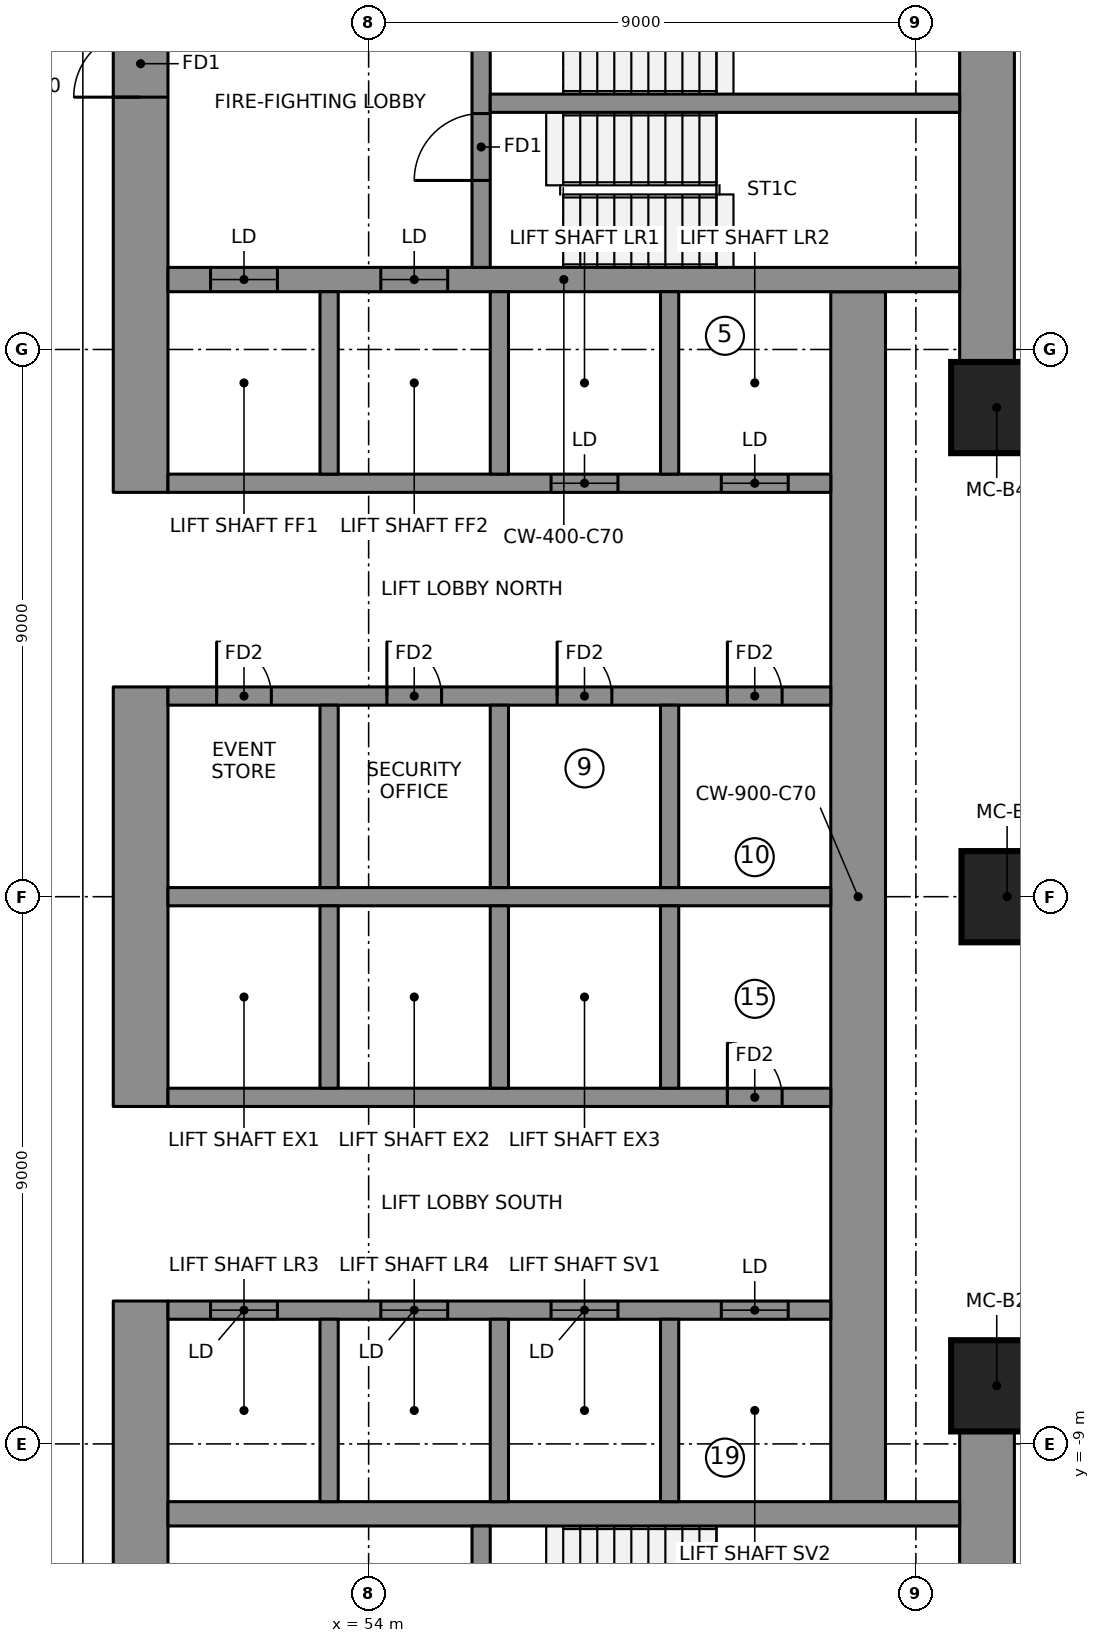
"""IFC4 building model, lengths in metres.
Left out: names, types, materials, properties, quantities, classifications, styles, units other than length and angle.
Written with IfcOpenShell. Run it as: python <this file> out.ifc"""

import sys

from ifc_helpers import new_model, si_unit, direction, frame, frame_2d, origin, origin_2d, place, context, subcontext, project, spatial, rectangle, extrude, element, fill, save


model = new_model("IFC4")
c1 = context("Model", 3, precision=1e-05, world=origin(), true_north=direction((0.0, 1.0)))
c2 = subcontext(c1, "Body", "Model", "MODEL_VIEW")
j1 = project(units=[si_unit("LENGTHUNIT", "METRE"), si_unit("PLANEANGLEUNIT", "RADIAN")], contexts=[c1])
p1 = place(None, origin())
s1 = spatial("IfcSite", under=j1, at=p1, CompositionType="ELEMENT")
p2 = place(p1, origin())
s2 = spatial("IfcBuilding", under=s1, at=p2, CompositionType="ELEMENT")
p3 = place(p2, frame((0.0, 0.0, 133.75)))
s3 = spatial("IfcBuildingStorey", under=s2, at=p3, CompositionType="ELEMENT", Elevation=133.75)
p4 = place(p3, frame((50.25, 6.65, 0.0), z_axis=(0.0, 0.0, 1.0), x_axis=(0.0, 1.0, 0.0)))
e1 = element("IfcWall", 1, at=p4, inside=s3, PredefinedType="SHEAR", context=c2, shape_type="SweptSolid", body=[
    extrude(rectangle(XDim=10.0, YDim=0.9, at=frame_2d((5.0, 0.0))), origin(), (0.0, 0.0, 1.0), 3.55),
])
p5 = place(p4, frame((6.5, 0.0, 0.0)))
e2 = element("IfcOpeningElement", 2, at=p5, cuts=e1, PredefinedType="OPENING", context=c2, shape_type="SweptSolid", body=[
    extrude(rectangle(XDim=1.1, YDim=2.1, at=frame_2d((0.55, 1.05))), frame((0.0, 0.46, 0.0), z_axis=(0.0, -1.0, 0.0), x_axis=(1.0, 0.0, 0.0)), (0.0, 0.0, 1.0), 0.92),
])
p6 = place(p3, frame((50.25, -3.45, 0.0), z_axis=(0.0, 0.0, 1.0), x_axis=(0.0, 1.0, 0.0)))
e3 = element("IfcWall", 3, at=p6, inside=s3, PredefinedType="SHEAR", context=c2, shape_type="SweptSolid", body=[
    extrude(rectangle(XDim=6.9, YDim=0.9, at=frame_2d((3.45, 0.0))), origin(), (0.0, 0.0, 1.0), 3.55),
])
p7 = place(p3, frame((50.25, -16.65, 0.0), z_axis=(0.0, 0.0, 1.0), x_axis=(0.0, 1.0, 0.0)))
e4 = element("IfcWall", 4, at=p7, inside=s3, PredefinedType="SHEAR", context=c2, shape_type="SweptSolid", body=[
    extrude(rectangle(XDim=10.0, YDim=0.9, at=frame_2d((5.0, 0.0))), origin(), (0.0, 0.0, 1.0), 3.55),
])
p8 = place(p7, frame((2.4, 0.0, 0.0)))
e5 = element("IfcOpeningElement", 5, at=p8, cuts=e4, PredefinedType="OPENING", context=c2, shape_type="SweptSolid", body=[
    extrude(rectangle(XDim=1.1, YDim=2.1, at=frame_2d((0.55, 1.05))), frame((0.0, 0.46, 0.0), z_axis=(0.0, -1.0, 0.0), x_axis=(1.0, 0.0, 0.0)), (0.0, 0.0, 1.0), 0.92),
])
for number, where, z_axis, x_axis in (
    (6, (64.17, 8.745, 0.0), (0.0, 0.0, 1.0), (0.0, 1.0, 0.0)),
    (7, (64.17, -15.75, 0.0), (0.0, 0.0, 1.0), (0.0, 1.0, 0.0)),
):
    element("IfcWall", number, at=place(p3, frame(where, z_axis=z_axis, x_axis=x_axis)), inside=s3, PredefinedType="SHEAR", context=c2, shape_type="SweptSolid", body=[
        extrude(rectangle(XDim=7.005, YDim=0.9, at=frame_2d((3.503, 0.0))), origin(), (0.0, 0.0, 1.0), 3.55),
    ])
p9 = place(p3, frame((62.05, -9.95, 0.0), z_axis=(0.0, 0.0, 1.0), x_axis=(0.0, 1.0, 0.0)))
e8 = element("IfcWall", 8, at=p9, inside=s3, PredefinedType="SHEAR", context=c2, shape_type="SweptSolid", body=[
    extrude(rectangle(XDim=19.9, YDim=0.9, at=frame_2d((9.95, 0.0))), origin(), (0.0, 0.0, 1.0), 3.55),
])
p10 = place(p3, frame((50.7, 10.15, 0.0), z_axis=(0.0, 0.0, 1.0), x_axis=(1.0, 0.0, 0.0)))
e9 = element("IfcWall", 9, at=p10, inside=s3, PredefinedType="SHEAR", context=c2, shape_type="SweptSolid", body=[
    extrude(rectangle(XDim=13.02, YDim=0.4, at=frame_2d((6.51, 0.0))), origin(), (0.0, 0.0, 1.0), 3.55),
])
p11 = place(p10, frame((0.7, 0.0, 0.0)))
e10 = element("IfcOpeningElement", 10, at=p11, cuts=e9, PredefinedType="OPENING", context=c2, shape_type="SweptSolid", body=[
    extrude(rectangle(XDim=1.1, YDim=2.1, at=frame_2d((0.55, 1.05))), frame((0.0, 0.21, 0.0), z_axis=(0.0, -1.0, 0.0), x_axis=(1.0, 0.0, 0.0)), (0.0, 0.0, 1.0), 0.42),
])
p12 = place(p10, frame((3.5, 0.0, 0.0)))
e11 = element("IfcOpeningElement", 11, at=p12, cuts=e9, PredefinedType="OPENING", context=c2, shape_type="SweptSolid", body=[
    extrude(rectangle(XDim=1.1, YDim=2.1, at=frame_2d((0.55, 1.05))), frame((0.0, 0.21, 0.0), z_axis=(0.0, -1.0, 0.0), x_axis=(1.0, 0.0, 0.0)), (0.0, 0.0, 1.0), 0.42),
])
p13 = place(p3, frame((50.7, -10.15, 0.0), z_axis=(0.0, 0.0, 1.0), x_axis=(1.0, 0.0, 0.0)))
e12 = element("IfcWall", 12, at=p13, inside=s3, PredefinedType="SHEAR", context=c2, shape_type="SweptSolid", body=[
    extrude(rectangle(XDim=13.02, YDim=0.4, at=frame_2d((6.51, 0.0))), origin(), (0.0, 0.0, 1.0), 3.55),
])
p14 = place(p3, frame((50.7, 0.0, 0.0), z_axis=(0.0, 0.0, 1.0), x_axis=(1.0, 0.0, 0.0)))
e13 = element("IfcWall", 13, at=p14, inside=s3, PredefinedType="SHEAR", context=c2, shape_type="SweptSolid", body=[
    extrude(rectangle(XDim=10.9, YDim=0.3, at=frame_2d((5.45, 0.0))), origin(), (0.0, 0.0, 1.0), 3.55),
])
p15 = place(p3, frame((50.7, 3.3, 0.0), z_axis=(0.0, 0.0, 1.0), x_axis=(1.0, 0.0, 0.0)))
e14 = element("IfcWall", 14, at=p15, inside=s3, PredefinedType="SHEAR", context=c2, shape_type="SweptSolid", body=[
    extrude(rectangle(XDim=10.9, YDim=0.3, at=frame_2d((5.45, 0.0))), origin(), (0.0, 0.0, 1.0), 3.55),
])
p16 = place(p15, frame((0.8, 0.0, 0.0)))
e15 = element("IfcOpeningElement", 15, at=p16, cuts=e14, PredefinedType="OPENING", context=c2, shape_type="SweptSolid", body=[
    extrude(rectangle(XDim=0.9, YDim=2.1, at=frame_2d((0.45, 1.05))), frame((0.0, 0.16, 0.0), z_axis=(0.0, -1.0, 0.0), x_axis=(1.0, 0.0, 0.0)), (0.0, 0.0, 1.0), 0.32),
])
p17 = place(p15, frame((3.6, 0.0, 0.0)))
e16 = element("IfcOpeningElement", 16, at=p17, cuts=e14, PredefinedType="OPENING", context=c2, shape_type="SweptSolid", body=[
    extrude(rectangle(XDim=0.9, YDim=2.1, at=frame_2d((0.45, 1.05))), frame((0.0, 0.16, 0.0), z_axis=(0.0, -1.0, 0.0), x_axis=(1.0, 0.0, 0.0)), (0.0, 0.0, 1.0), 0.32),
])
p18 = place(p15, frame((6.4, 0.0, 0.0)))
e17 = element("IfcOpeningElement", 17, at=p18, cuts=e14, PredefinedType="OPENING", context=c2, shape_type="SweptSolid", body=[
    extrude(rectangle(XDim=0.9, YDim=2.1, at=frame_2d((0.45, 1.05))), frame((0.0, 0.16, 0.0), z_axis=(0.0, -1.0, 0.0), x_axis=(1.0, 0.0, 0.0)), (0.0, 0.0, 1.0), 0.32),
])
p19 = place(p15, frame((9.2, 0.0, 0.0)))
e18 = element("IfcOpeningElement", 18, at=p19, cuts=e14, PredefinedType="OPENING", context=c2, shape_type="SweptSolid", body=[
    extrude(rectangle(XDim=0.9, YDim=2.1, at=frame_2d((0.45, 1.05))), frame((0.0, 0.16, 0.0), z_axis=(0.0, -1.0, 0.0), x_axis=(1.0, 0.0, 0.0)), (0.0, 0.0, 1.0), 0.32),
])
p20 = place(p3, frame((50.7, 6.8, 0.0), z_axis=(0.0, 0.0, 1.0), x_axis=(1.0, 0.0, 0.0)))
e19 = element("IfcWall", 19, at=p20, inside=s3, PredefinedType="SHEAR", context=c2, shape_type="SweptSolid", body=[
    extrude(rectangle(XDim=10.9, YDim=0.3, at=frame_2d((5.45, 0.0))), origin(), (0.0, 0.0, 1.0), 3.55),
])
p21 = place(p20, frame((6.3, 0.0, 0.0)))
e20 = element("IfcOpeningElement", 20, at=p21, cuts=e19, PredefinedType="OPENING", context=c2, shape_type="SweptSolid", body=[
    extrude(rectangle(XDim=1.1, YDim=2.1, at=frame_2d((0.55, 1.05))), frame((0.0, 0.16, 0.0), z_axis=(0.0, -1.0, 0.0), x_axis=(1.0, 0.0, 0.0)), (0.0, 0.0, 1.0), 0.32),
])
p22 = place(p20, frame((9.1, 0.0, 0.0)))
e21 = element("IfcOpeningElement", 21, at=p22, cuts=e19, PredefinedType="OPENING", context=c2, shape_type="SweptSolid", body=[
    extrude(rectangle(XDim=1.1, YDim=2.1, at=frame_2d((0.55, 1.05))), frame((0.0, 0.16, 0.0), z_axis=(0.0, -1.0, 0.0), x_axis=(1.0, 0.0, 0.0)), (0.0, 0.0, 1.0), 0.32),
])
for number, where, z_axis, x_axis in (
    (22, (53.35, 0.15, 0.0), (0.0, 0.0, 1.0), (0.0, 1.0, 0.0)),
    (23, (53.35, 6.95, 0.0), (0.0, 0.0, 1.0), (0.0, 1.0, 0.0)),
    (24, (56.15, 0.15, 0.0), (0.0, 0.0, 1.0), (0.0, 1.0, 0.0)),
    (25, (56.15, 6.95, 0.0), (0.0, 0.0, 1.0), (0.0, 1.0, 0.0)),
    (26, (58.95, 0.15, 0.0), (0.0, 0.0, 1.0), (0.0, 1.0, 0.0)),
    (27, (58.95, 6.95, 0.0), (0.0, 0.0, 1.0), (0.0, 1.0, 0.0)),
):
    element("IfcWall", number, at=place(p3, frame(where, z_axis=z_axis, x_axis=x_axis)), inside=s3, PredefinedType="SHEAR", context=c2, shape_type="SweptSolid", body=[
        extrude(rectangle(XDim=3.0, YDim=0.3, at=frame_2d((1.5, 0.0))), origin(), (0.0, 0.0, 1.0), 3.55),
    ])
p23 = place(p3, frame((50.7, -3.3, 0.0), z_axis=(0.0, 0.0, 1.0), x_axis=(1.0, 0.0, 0.0)))
e28 = element("IfcWall", 28, at=p23, inside=s3, PredefinedType="SHEAR", context=c2, shape_type="SweptSolid", body=[
    extrude(rectangle(XDim=10.9, YDim=0.3, at=frame_2d((5.45, 0.0))), origin(), (0.0, 0.0, 1.0), 3.55),
])
p24 = place(p23, frame((9.2, 0.0, 0.0)))
e29 = element("IfcOpeningElement", 29, at=p24, cuts=e28, PredefinedType="OPENING", context=c2, shape_type="SweptSolid", body=[
    extrude(rectangle(XDim=0.9, YDim=2.1, at=frame_2d((0.45, 1.05))), frame((0.0, 0.16, 0.0), z_axis=(0.0, -1.0, 0.0), x_axis=(1.0, 0.0, 0.0)), (0.0, 0.0, 1.0), 0.32),
])
p25 = place(p3, frame((50.7, -6.8, 0.0), z_axis=(0.0, 0.0, 1.0), x_axis=(1.0, 0.0, 0.0)))
e30 = element("IfcWall", 30, at=p25, inside=s3, PredefinedType="SHEAR", context=c2, shape_type="SweptSolid", body=[
    extrude(rectangle(XDim=10.9, YDim=0.3, at=frame_2d((5.45, 0.0))), origin(), (0.0, 0.0, 1.0), 3.55),
])
p26 = place(p25, frame((0.7, 0.0, 0.0)))
e31 = element("IfcOpeningElement", 31, at=p26, cuts=e30, PredefinedType="OPENING", context=c2, shape_type="SweptSolid", body=[
    extrude(rectangle(XDim=1.1, YDim=2.1, at=frame_2d((0.55, 1.05))), frame((0.0, 0.16, 0.0), z_axis=(0.0, -1.0, 0.0), x_axis=(1.0, 0.0, 0.0)), (0.0, 0.0, 1.0), 0.32),
])
p27 = place(p25, frame((3.5, 0.0, 0.0)))
e32 = element("IfcOpeningElement", 32, at=p27, cuts=e30, PredefinedType="OPENING", context=c2, shape_type="SweptSolid", body=[
    extrude(rectangle(XDim=1.1, YDim=2.1, at=frame_2d((0.55, 1.05))), frame((0.0, 0.16, 0.0), z_axis=(0.0, -1.0, 0.0), x_axis=(1.0, 0.0, 0.0)), (0.0, 0.0, 1.0), 0.32),
])
p28 = place(p25, frame((6.3, 0.0, 0.0)))
e33 = element("IfcOpeningElement", 33, at=p28, cuts=e30, PredefinedType="OPENING", context=c2, shape_type="SweptSolid", body=[
    extrude(rectangle(XDim=1.1, YDim=2.1, at=frame_2d((0.55, 1.05))), frame((0.0, 0.16, 0.0), z_axis=(0.0, -1.0, 0.0), x_axis=(1.0, 0.0, 0.0)), (0.0, 0.0, 1.0), 0.32),
])
p29 = place(p25, frame((9.1, 0.0, 0.0)))
e34 = element("IfcOpeningElement", 34, at=p29, cuts=e30, PredefinedType="OPENING", context=c2, shape_type="SweptSolid", body=[
    extrude(rectangle(XDim=1.1, YDim=2.1, at=frame_2d((0.55, 1.05))), frame((0.0, 0.16, 0.0), z_axis=(0.0, -1.0, 0.0), x_axis=(1.0, 0.0, 0.0)), (0.0, 0.0, 1.0), 0.32),
])
for number, where, z_axis, x_axis in (
    (35, (53.35, -3.15, 0.0), (0.0, 0.0, 1.0), (0.0, 1.0, 0.0)),
    (36, (53.35, -9.95, 0.0), (0.0, 0.0, 1.0), (0.0, 1.0, 0.0)),
    (37, (56.15, -3.15, 0.0), (0.0, 0.0, 1.0), (0.0, 1.0, 0.0)),
    (38, (56.15, -9.95, 0.0), (0.0, 0.0, 1.0), (0.0, 1.0, 0.0)),
    (39, (58.95, -3.15, 0.0), (0.0, 0.0, 1.0), (0.0, 1.0, 0.0)),
    (40, (58.95, -9.95, 0.0), (0.0, 0.0, 1.0), (0.0, 1.0, 0.0)),
):
    element("IfcWall", number, at=place(p3, frame(where, z_axis=z_axis, x_axis=x_axis)), inside=s3, PredefinedType="SHEAR", context=c2, shape_type="SweptSolid", body=[
        extrude(rectangle(XDim=3.0, YDim=0.3, at=frame_2d((1.5, 0.0))), origin(), (0.0, 0.0, 1.0), 3.55),
    ])
p30 = place(p3, frame((55.85, 10.35, 0.0), z_axis=(0.0, 0.0, 1.0), x_axis=(0.0, 1.0, 0.0)))
e41 = element("IfcWall", 41, at=p30, inside=s3, PredefinedType="SHEAR", context=c2, shape_type="SweptSolid", body=[
    extrude(rectangle(XDim=5.4, YDim=0.3, at=frame_2d((2.7, 0.0))), origin(), (0.0, 0.0, 1.0), 3.55),
])
p31 = place(p30, frame((1.43, 0.0, 0.0)))
e42 = element("IfcOpeningElement", 42, at=p31, cuts=e41, PredefinedType="OPENING", context=c2, shape_type="SweptSolid", body=[
    extrude(rectangle(XDim=1.1, YDim=2.1, at=frame_2d((0.55, 1.05))), frame((0.0, 0.16, 0.0), z_axis=(0.0, -1.0, 0.0), x_axis=(1.0, 0.0, 0.0)), (0.0, 0.0, 1.0), 0.32),
])
p32 = place(p30, frame((3.6, 0.0, 0.0)))
e43 = element("IfcOpeningElement", 43, at=p32, cuts=e41, PredefinedType="OPENING", context=c2, shape_type="SweptSolid", body=[
    extrude(rectangle(XDim=1.1, YDim=2.1, at=frame_2d((0.55, 1.05))), frame((0.0, 0.16, 0.0), z_axis=(0.0, -1.0, 0.0), x_axis=(1.0, 0.0, 0.0)), (0.0, 0.0, 1.0), 0.32),
])
p33 = place(p3, frame((55.85, -15.75, 0.0), z_axis=(0.0, 0.0, 1.0), x_axis=(0.0, 1.0, 0.0)))
e44 = element("IfcWall", 44, at=p33, inside=s3, PredefinedType="SHEAR", context=c2, shape_type="SweptSolid", body=[
    extrude(rectangle(XDim=5.4, YDim=0.3, at=frame_2d((2.7, 0.0))), origin(), (0.0, 0.0, 1.0), 3.55),
])
p34 = place(p33, frame((3.6, 0.0, 0.0)))
e45 = element("IfcOpeningElement", 45, at=p34, cuts=e44, PredefinedType="OPENING", context=c2, shape_type="SweptSolid", body=[
    extrude(rectangle(XDim=1.1, YDim=2.1, at=frame_2d((0.55, 1.05))), frame((0.0, 0.16, 0.0), z_axis=(0.0, -1.0, 0.0), x_axis=(1.0, 0.0, 0.0)), (0.0, 0.0, 1.0), 0.32),
])
p35 = place(p33, frame((0.8, 0.0, 0.0)))
e46 = element("IfcOpeningElement", 46, at=p35, cuts=e44, PredefinedType="OPENING", context=c2, shape_type="SweptSolid", body=[
    extrude(rectangle(XDim=0.9, YDim=2.1, at=frame_2d((0.45, 1.05))), frame((0.0, 0.16, 0.0), z_axis=(0.0, -1.0, 0.0), x_axis=(1.0, 0.0, 0.0)), (0.0, 0.0, 1.0), 0.32),
])
p36 = place(p3, frame((56.0, 13.05, 0.0), z_axis=(0.0, 0.0, 1.0), x_axis=(1.0, 0.0, 0.0)))
e47 = element("IfcWall", 47, at=p36, inside=s3, PredefinedType="SHEAR", context=c2, shape_type="SweptSolid", body=[
    extrude(rectangle(XDim=7.72, YDim=0.3, at=frame_2d((3.86, 0.0))), origin(), (0.0, 0.0, 1.0), 3.55),
])
for number, where, z_axis, x_axis in (
    (48, (64.33, -8.045, 0.0), (0.0, 0.0, 1.0), (1.0, 0.0, 0.0)),
    (49, (64.5, 0.0, 0.0), (0.0, 0.0, 1.0), (1.0, 0.0, 0.0)),
    (50, (64.33, 8.045, 0.0), (0.0, 0.0, 1.0), (1.0, 0.0, 0.0)),
):
    element("IfcColumn", number, at=place(p3, frame(where, z_axis=z_axis, x_axis=x_axis)), inside=s3, PredefinedType="COLUMN", context=c2, shape_type="SweptSolid", body=[
        extrude(rectangle(XDim=1.5, YDim=1.5, at=origin_2d()), origin(), (0.0, 0.0, 1.0), 3.55),
    ])
p37 = place(p11, origin())
e51 = element("IfcDoor", 51, at=p37, inside=s3, OperationType="DOUBLE_DOOR_SLIDING", PredefinedType="DOOR", context=c2, shape_type="SweptSolid", body=[
    extrude(rectangle(XDim=1.1, YDim=2.1, at=frame_2d((0.55, 1.05))), frame((0.0, 0.025, 0.0), z_axis=(0.0, -1.0, 0.0), x_axis=(1.0, 0.0, 0.0)), (0.0, 0.0, 1.0), 0.05),
])
fill(e10, e51)
p38 = place(p12, origin())
e52 = element("IfcDoor", 52, at=p38, inside=s3, OperationType="DOUBLE_DOOR_SLIDING", PredefinedType="DOOR", context=c2, shape_type="SweptSolid", body=[
    extrude(rectangle(XDim=1.1, YDim=2.1, at=frame_2d((0.55, 1.05))), frame((0.0, 0.025, 0.0), z_axis=(0.0, -1.0, 0.0), x_axis=(1.0, 0.0, 0.0)), (0.0, 0.0, 1.0), 0.05),
])
fill(e11, e52)
p39 = place(p21, origin())
e53 = element("IfcDoor", 53, at=p39, inside=s3, OperationType="DOUBLE_DOOR_SLIDING", PredefinedType="DOOR", context=c2, shape_type="SweptSolid", body=[
    extrude(rectangle(XDim=1.1, YDim=2.1, at=frame_2d((0.55, 1.05))), frame((0.0, 0.025, 0.0), z_axis=(0.0, -1.0, 0.0), x_axis=(1.0, 0.0, 0.0)), (0.0, 0.0, 1.0), 0.05),
])
fill(e20, e53)
p40 = place(p22, origin())
e54 = element("IfcDoor", 54, at=p40, inside=s3, OperationType="DOUBLE_DOOR_SLIDING", PredefinedType="DOOR", context=c2, shape_type="SweptSolid", body=[
    extrude(rectangle(XDim=1.1, YDim=2.1, at=frame_2d((0.55, 1.05))), frame((0.0, 0.025, 0.0), z_axis=(0.0, -1.0, 0.0), x_axis=(1.0, 0.0, 0.0)), (0.0, 0.0, 1.0), 0.05),
])
fill(e21, e54)
p41 = place(p26, origin())
e55 = element("IfcDoor", 55, at=p41, inside=s3, OperationType="DOUBLE_DOOR_SLIDING", PredefinedType="DOOR", context=c2, shape_type="SweptSolid", body=[
    extrude(rectangle(XDim=1.1, YDim=2.1, at=frame_2d((0.55, 1.05))), frame((0.0, 0.025, 0.0), z_axis=(0.0, -1.0, 0.0), x_axis=(1.0, 0.0, 0.0)), (0.0, 0.0, 1.0), 0.05),
])
fill(e31, e55)
p42 = place(p27, origin())
e56 = element("IfcDoor", 56, at=p42, inside=s3, OperationType="DOUBLE_DOOR_SLIDING", PredefinedType="DOOR", context=c2, shape_type="SweptSolid", body=[
    extrude(rectangle(XDim=1.1, YDim=2.1, at=frame_2d((0.55, 1.05))), frame((0.0, 0.025, 0.0), z_axis=(0.0, -1.0, 0.0), x_axis=(1.0, 0.0, 0.0)), (0.0, 0.0, 1.0), 0.05),
])
fill(e32, e56)
p43 = place(p28, origin())
e57 = element("IfcDoor", 57, at=p43, inside=s3, OperationType="DOUBLE_DOOR_SLIDING", PredefinedType="DOOR", context=c2, shape_type="SweptSolid", body=[
    extrude(rectangle(XDim=1.1, YDim=2.1, at=frame_2d((0.55, 1.05))), frame((0.0, 0.025, 0.0), z_axis=(0.0, -1.0, 0.0), x_axis=(1.0, 0.0, 0.0)), (0.0, 0.0, 1.0), 0.05),
])
fill(e33, e57)
p44 = place(p29, origin())
e58 = element("IfcDoor", 58, at=p44, inside=s3, OperationType="DOUBLE_DOOR_SLIDING", PredefinedType="DOOR", context=c2, shape_type="SweptSolid", body=[
    extrude(rectangle(XDim=1.1, YDim=2.1, at=frame_2d((0.55, 1.05))), frame((0.0, 0.025, 0.0), z_axis=(0.0, -1.0, 0.0), x_axis=(1.0, 0.0, 0.0)), (0.0, 0.0, 1.0), 0.05),
])
fill(e34, e58)
p45 = place(p31, origin())
e59 = element("IfcDoor", 59, at=p45, inside=s3, OperationType="SINGLE_SWING_RIGHT", PredefinedType="DOOR", context=c2, shape_type="SweptSolid", body=[
    extrude(rectangle(XDim=1.1, YDim=2.1, at=frame_2d((0.55, 1.05))), frame((0.0, 0.025, 0.0), z_axis=(0.0, -1.0, 0.0), x_axis=(1.0, 0.0, 0.0)), (0.0, 0.0, 1.0), 0.05),
])
fill(e42, e59)
p46 = place(p5, origin())
e60 = element("IfcDoor", 60, at=p46, inside=s3, OperationType="SINGLE_SWING_RIGHT", PredefinedType="DOOR", context=c2, shape_type="SweptSolid", body=[
    extrude(rectangle(XDim=1.1, YDim=2.1, at=frame_2d((0.55, 1.05))), frame((0.0, 0.025, 0.0), z_axis=(0.0, -1.0, 0.0), x_axis=(1.0, 0.0, 0.0)), (0.0, 0.0, 1.0), 0.05),
])
fill(e2, e60)
p47 = place(p16, origin())
e61 = element("IfcDoor", 61, at=p47, inside=s3, OperationType="SINGLE_SWING_LEFT", PredefinedType="DOOR", context=c2, shape_type="SweptSolid", body=[
    extrude(rectangle(XDim=0.9, YDim=2.1, at=frame_2d((0.45, 1.05))), frame((0.0, 0.025, 0.0), z_axis=(0.0, -1.0, 0.0), x_axis=(1.0, 0.0, 0.0)), (0.0, 0.0, 1.0), 0.05),
])
fill(e15, e61)
p48 = place(p17, origin())
e62 = element("IfcDoor", 62, at=p48, inside=s3, OperationType="SINGLE_SWING_LEFT", PredefinedType="DOOR", context=c2, shape_type="SweptSolid", body=[
    extrude(rectangle(XDim=0.9, YDim=2.1, at=frame_2d((0.45, 1.05))), frame((0.0, 0.025, 0.0), z_axis=(0.0, -1.0, 0.0), x_axis=(1.0, 0.0, 0.0)), (0.0, 0.0, 1.0), 0.05),
])
fill(e16, e62)
p49 = place(p18, origin())
e63 = element("IfcDoor", 63, at=p49, inside=s3, OperationType="SINGLE_SWING_LEFT", PredefinedType="DOOR", context=c2, shape_type="SweptSolid", body=[
    extrude(rectangle(XDim=0.9, YDim=2.1, at=frame_2d((0.45, 1.05))), frame((0.0, 0.025, 0.0), z_axis=(0.0, -1.0, 0.0), x_axis=(1.0, 0.0, 0.0)), (0.0, 0.0, 1.0), 0.05),
])
fill(e17, e63)
p50 = place(p19, origin())
e64 = element("IfcDoor", 64, at=p50, inside=s3, OperationType="SINGLE_SWING_LEFT", PredefinedType="DOOR", context=c2, shape_type="SweptSolid", body=[
    extrude(rectangle(XDim=0.9, YDim=2.1, at=frame_2d((0.45, 1.05))), frame((0.0, 0.025, 0.0), z_axis=(0.0, -1.0, 0.0), x_axis=(1.0, 0.0, 0.0)), (0.0, 0.0, 1.0), 0.05),
])
fill(e18, e64)
p51 = place(p24, origin())
e65 = element("IfcDoor", 65, at=p51, inside=s3, OperationType="SINGLE_SWING_LEFT", PredefinedType="DOOR", context=c2, shape_type="SweptSolid", body=[
    extrude(rectangle(XDim=0.9, YDim=2.1, at=frame_2d((0.45, 1.05))), frame((0.0, 0.025, 0.0), z_axis=(0.0, -1.0, 0.0), x_axis=(1.0, 0.0, 0.0)), (0.0, 0.0, 1.0), 0.05),
])
fill(e29, e65)
save(model, sys.argv[1])
